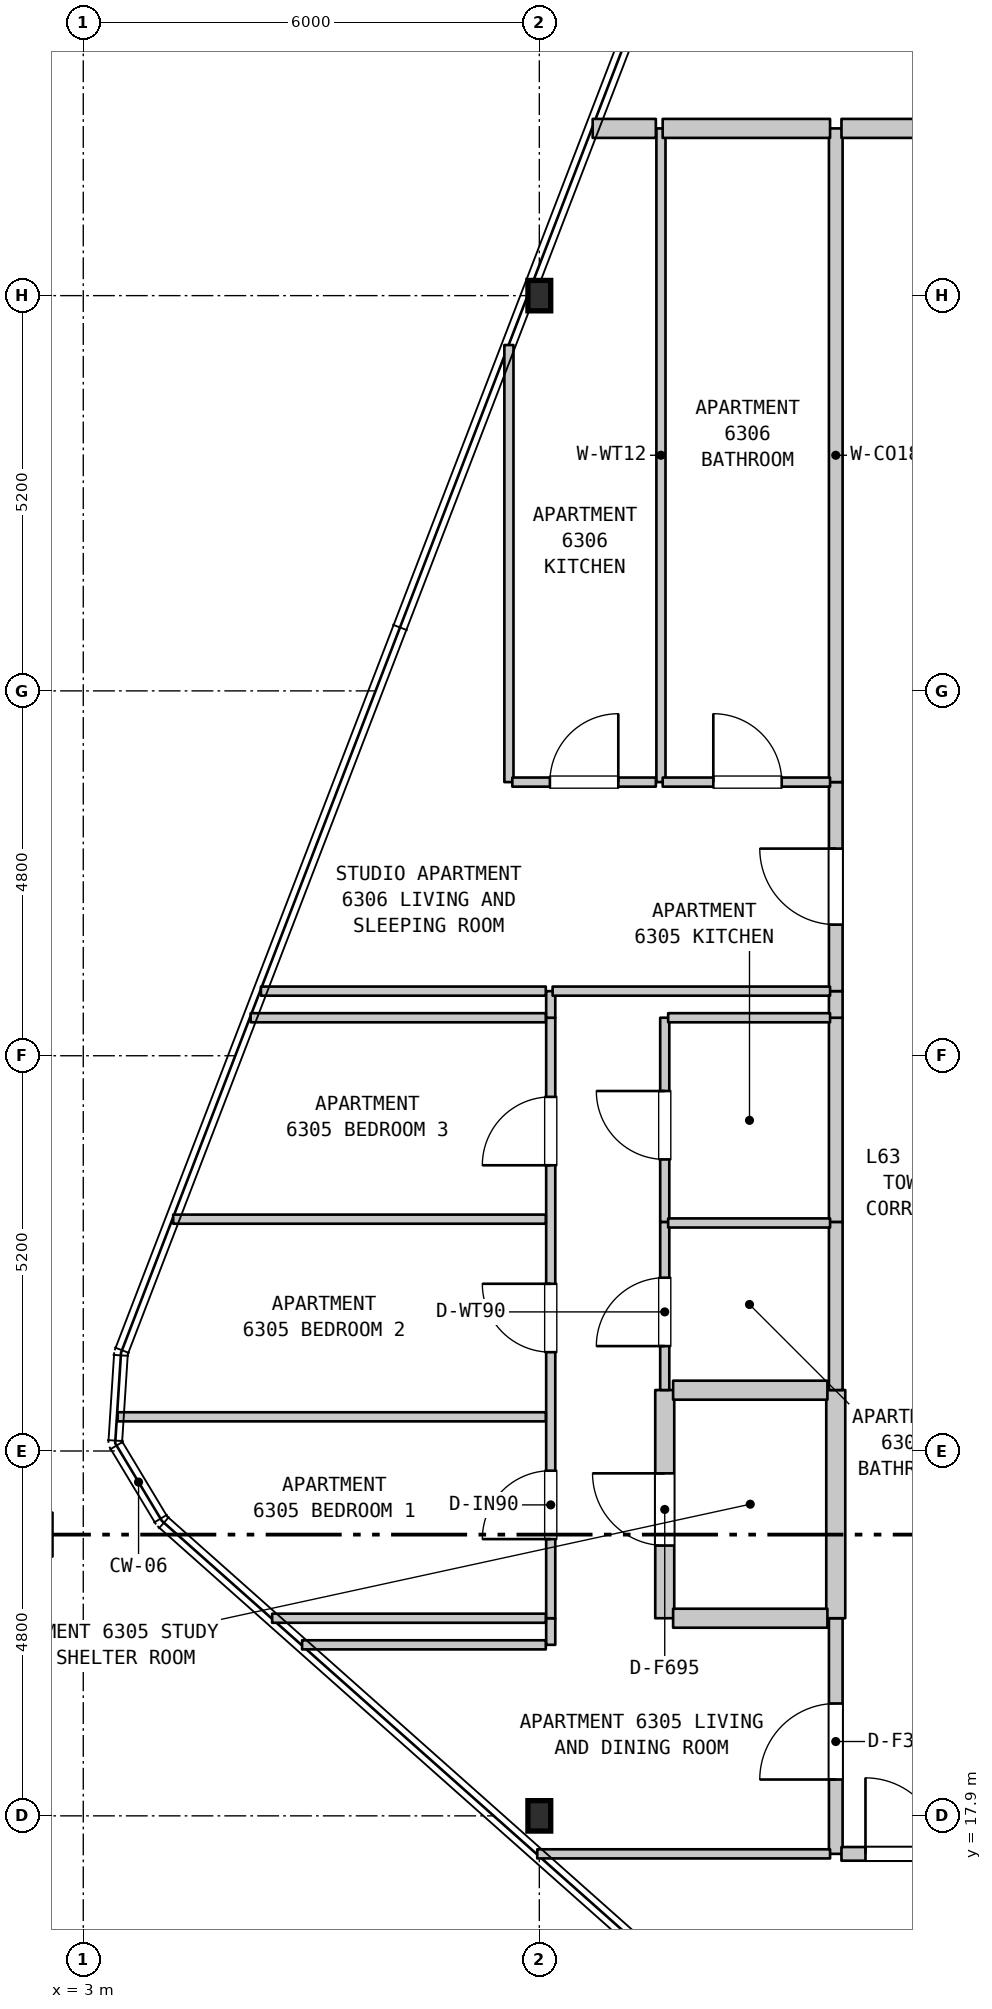
"""IFC4 building model, lengths in metres.
Left out: names, types, materials, properties, quantities, classifications, styles, units other than length and angle.
Written with IfcOpenShell. Run it as: python <this file> out.ifc"""

import sys

from ifc_helpers import new_model, si_unit, direction, frame, frame_2d, origin, origin_2d, place, context, subcontext, project, spatial, rectangle, i_section, extrude, element, fill, save


model = new_model("IFC4")
c1 = context("Model", 3, precision=1e-05, world=origin(), true_north=direction((0.0, 1.0)))
c2 = subcontext(c1, "Body", "Model", "MODEL_VIEW")
j1 = project(units=[si_unit("LENGTHUNIT", "METRE"), si_unit("PLANEANGLEUNIT", "RADIAN")], contexts=[c1])
p1 = place(None, origin())
s1 = spatial("IfcSite", under=j1, at=p1, CompositionType="ELEMENT")
p2 = place(p1, origin())
s2 = spatial("IfcBuilding", under=s1, at=p2, CompositionType="ELEMENT")
p3 = place(p2, frame((0.0, 0.0, 254.7)))
s3 = spatial("IfcBuildingStorey", under=s2, at=p3, CompositionType="ELEMENT", Elevation=254.7)
for number, where, z_axis, x_axis in (
    (1, (9.0, 17.9, 0.0), (0.0, 0.0, 1.0), (1.0, 0.0, 0.0)),
    (2, (9.0, 37.9, 0.0), (0.0, 0.0, 1.0), (1.0, 0.0, 0.0)),
):
    element("IfcColumn", number, at=place(p3, frame(where, z_axis=z_axis, x_axis=x_axis)), inside=s3, PredefinedType="COLUMN", context=c2, shape_type="SweptSolid", body=[
        extrude(i_section(OverallWidth=0.3, OverallDepth=0.4, WebThickness=0.013, FlangeThickness=0.024, FilletRadius=0.027, at=origin_2d()), origin(), (0.0, 0.0, 1.0), 3.7),
    ])
p4 = place(p3, frame((8.6, 31.5, 0.0), z_axis=(0.0, 0.0, 1.0), x_axis=(0.0, 1.0, 0.0)))
e3 = element("IfcWall", 3, at=p4, inside=s3, PredefinedType="PARTITIONING", context=c2, shape_type="SweptSolid", body=[
    extrude(rectangle(XDim=5.75, YDim=0.12, at=frame_2d((2.875, 0.0))), origin(), (0.0, 0.0, 1.0), 3.39),
])
p5 = place(p3, frame((9.15, 20.15, 0.0), z_axis=(0.0, 0.0, 1.0), x_axis=(0.0, 1.0, 0.0)))
e4 = element("IfcWall", 4, at=p5, inside=s3, PredefinedType="PARTITIONING", context=c2, shape_type="SweptSolid", body=[
    extrude(rectangle(XDim=0.35, YDim=0.12, at=frame_2d((0.175, 0.0))), origin(), (0.0, 0.0, 1.0), 3.39),
])
p6 = place(p3, frame((9.15, 20.5, 0.0), z_axis=(0.0, 0.0, 1.0), x_axis=(0.0, 1.0, 0.0)))
e5 = element("IfcWall", 5, at=p6, inside=s3, PredefinedType="PARTITIONING", context=c2, shape_type="SweptSolid", body=[
    extrude(rectangle(XDim=7.9, YDim=0.12, at=frame_2d((3.95, 0.0))), origin(), (0.0, 0.0, 1.0), 2.79),
])
p7 = place(p6, frame((1.041, 0.0, 0.0)))
e6 = element("IfcOpeningElement", 6, at=p7, cuts=e5, PredefinedType="OPENING", context=c2, shape_type="SweptSolid", body=[
    extrude(rectangle(XDim=0.9, YDim=2.15, at=frame_2d((0.45, 1.075))), frame((0.0, 0.07, 0.0), z_axis=(0.0, -1.0, 0.0), x_axis=(1.0, 0.0, 0.0)), (0.0, 0.0, 1.0), 0.14),
])
p8 = place(p6, frame((3.5, 0.0, 0.0)))
e7 = element("IfcOpeningElement", 7, at=p8, cuts=e5, PredefinedType="OPENING", context=c2, shape_type="SweptSolid", body=[
    extrude(rectangle(XDim=0.9, YDim=2.15, at=frame_2d((0.45, 1.075))), frame((0.0, 0.07, 0.0), z_axis=(0.0, -1.0, 0.0), x_axis=(1.0, 0.0, 0.0)), (0.0, 0.0, 1.0), 0.14),
])
p9 = place(p6, frame((5.959, 0.0, 0.0)))
e8 = element("IfcOpeningElement", 8, at=p9, cuts=e5, PredefinedType="OPENING", context=c2, shape_type="SweptSolid", body=[
    extrude(rectangle(XDim=0.9, YDim=2.15, at=frame_2d((0.45, 1.075))), frame((0.0, 0.07, 0.0), z_axis=(0.0, -1.0, 0.0), x_axis=(1.0, 0.0, 0.0)), (0.0, 0.0, 1.0), 0.14),
])
p10 = place(p3, frame((9.15, 28.4, 0.0), z_axis=(0.0, 0.0, 1.0), x_axis=(0.0, 1.0, 0.0)))
e9 = element("IfcWall", 9, at=p10, inside=s3, PredefinedType="PARTITIONING", context=c2, shape_type="SweptSolid", body=[
    extrude(rectangle(XDim=0.35, YDim=0.12, at=frame_2d((0.175, 0.0))), origin(), (0.0, 0.0, 1.0), 3.39),
])
p11 = place(p3, frame((10.6, 31.5, 0.0), z_axis=(0.0, 0.0, 1.0), x_axis=(0.0, 1.0, 0.0)))
e10 = element("IfcWall", 10, at=p11, inside=s3, PredefinedType="PARTITIONING", context=c2, shape_type="SweptSolid", body=[
    extrude(rectangle(XDim=8.6, YDim=0.12, at=frame_2d((4.3, 0.0))), origin(), (0.0, 0.0, 1.0), 3.39),
])
p12 = place(p3, frame((10.65, 20.5, 0.0), z_axis=(0.0, 0.0, 1.0), x_axis=(0.0, 1.0, 0.0)))
e11 = element("IfcWall", 11, at=p12, inside=s3, PredefinedType="STANDARD", context=c2, shape_type="SweptSolid", body=[
    extrude(rectangle(XDim=3.002, YDim=0.25, at=frame_2d((1.501, 0.0))), origin(), (0.0, 0.0, 1.0), 3.39),
])
p13 = place(p12, frame((0.956, 0.0, 0.0)))
e12 = element("IfcOpeningElement", 12, at=p13, cuts=e11, PredefinedType="OPENING", context=c2, shape_type="SweptSolid", body=[
    extrude(rectangle(XDim=0.95, YDim=2.15, at=frame_2d((0.475, 1.075))), frame((0.0, 0.135, 0.0), z_axis=(0.0, -1.0, 0.0), x_axis=(1.0, 0.0, 0.0)), (0.0, 0.0, 1.0), 0.27),
])
p14 = place(p3, frame((10.65, 23.502, 0.0), z_axis=(0.0, 0.0, 1.0), x_axis=(0.0, 1.0, 0.0)))
e13 = element("IfcWall", 13, at=p14, inside=s3, PredefinedType="PARTITIONING", context=c2, shape_type="SweptSolid", body=[
    extrude(rectangle(XDim=2.212, YDim=0.12, at=frame_2d((1.106, 0.0))), origin(), (0.0, 0.0, 1.0), 3.39),
])
p15 = place(p14, frame((0.578, 0.0, 0.0)))
e14 = element("IfcOpeningElement", 14, at=p15, cuts=e13, PredefinedType="OPENING", context=c2, shape_type="SweptSolid", body=[
    extrude(rectangle(XDim=0.9, YDim=2.1, at=frame_2d((0.45, 1.05))), frame((0.0, 0.07, 0.0), z_axis=(0.0, -1.0, 0.0), x_axis=(1.0, 0.0, 0.0)), (0.0, 0.0, 1.0), 0.14),
])
p16 = place(p3, frame((10.65, 25.714, 0.0), z_axis=(0.0, 0.0, 1.0), x_axis=(0.0, 1.0, 0.0)))
e15 = element("IfcWall", 15, at=p16, inside=s3, PredefinedType="PARTITIONING", context=c2, shape_type="SweptSolid", body=[
    extrude(rectangle(XDim=2.686, YDim=0.12, at=frame_2d((1.343, 0.0))), origin(), (0.0, 0.0, 1.0), 3.39),
])
p17 = place(p16, frame((0.822, 0.0, 0.0)))
e16 = element("IfcOpeningElement", 16, at=p17, cuts=e15, PredefinedType="OPENING", context=c2, shape_type="SweptSolid", body=[
    extrude(rectangle(XDim=0.9, YDim=2.15, at=frame_2d((0.45, 1.075))), frame((0.0, 0.07, 0.0), z_axis=(0.0, -1.0, 0.0), x_axis=(1.0, 0.0, 0.0)), (0.0, 0.0, 1.0), 0.14),
])
p18 = place(p3, frame((12.9, 17.4, 0.0), z_axis=(0.0, 0.0, 1.0), x_axis=(0.0, 1.0, 0.0)))
e17 = element("IfcWall", 17, at=p18, inside=s3, PredefinedType="STANDARD", context=c2, shape_type="SweptSolid", body=[
    extrude(rectangle(XDim=3.1, YDim=0.18, at=frame_2d((1.55, 0.0))), origin(), (0.0, 0.0, 1.0), 3.39),
])
p19 = place(p18, frame((0.978, 0.0, 0.0)))
e18 = element("IfcOpeningElement", 18, at=p19, cuts=e17, PredefinedType="OPENING", context=c2, shape_type="SweptSolid", body=[
    extrude(rectangle(XDim=1.0, YDim=2.15, at=frame_2d((0.5, 1.075))), frame((0.0, 0.1, 0.0), z_axis=(0.0, -1.0, 0.0), x_axis=(1.0, 0.0, 0.0)), (0.0, 0.0, 1.0), 0.2),
])
p20 = place(p3, frame((12.9, 20.5, 0.0), z_axis=(0.0, 0.0, 1.0), x_axis=(0.0, 1.0, 0.0)))
e19 = element("IfcWall", 19, at=p20, inside=s3, PredefinedType="STANDARD", context=c2, shape_type="SweptSolid", body=[
    extrude(rectangle(XDim=3.002, YDim=0.25, at=frame_2d((1.501, 0.0))), origin(), (0.0, 0.0, 1.0), 3.39),
])
p21 = place(p3, frame((12.9, 23.502, 0.0), z_axis=(0.0, 0.0, 1.0), x_axis=(0.0, 1.0, 0.0)))
e20 = element("IfcWall", 20, at=p21, inside=s3, PredefinedType="STANDARD", context=c2, shape_type="SweptSolid", body=[
    extrude(rectangle(XDim=2.212, YDim=0.18, at=frame_2d((1.106, 0.0))), origin(), (0.0, 0.0, 1.0), 3.39),
])
p22 = place(p3, frame((12.9, 25.714, 0.0), z_axis=(0.0, 0.0, 1.0), x_axis=(0.0, 1.0, 0.0)))
e21 = element("IfcWall", 21, at=p22, inside=s3, PredefinedType="STANDARD", context=c2, shape_type="SweptSolid", body=[
    extrude(rectangle(XDim=2.686, YDim=0.18, at=frame_2d((1.343, 0.0))), origin(), (0.0, 0.0, 1.0), 3.39),
])
p23 = place(p3, frame((12.9, 28.4, 0.0), z_axis=(0.0, 0.0, 1.0), x_axis=(0.0, 1.0, 0.0)))
e22 = element("IfcWall", 22, at=p23, inside=s3, PredefinedType="STANDARD", context=c2, shape_type="SweptSolid", body=[
    extrude(rectangle(XDim=0.35, YDim=0.18, at=frame_2d((0.175, 0.0))), origin(), (0.0, 0.0, 1.0), 3.39),
])
p24 = place(p3, frame((12.9, 28.75, 0.0), z_axis=(0.0, 0.0, 1.0), x_axis=(0.0, 1.0, 0.0)))
e23 = element("IfcWall", 23, at=p24, inside=s3, PredefinedType="STANDARD", context=c2, shape_type="SweptSolid", body=[
    extrude(rectangle(XDim=2.75, YDim=0.18, at=frame_2d((1.375, 0.0))), origin(), (0.0, 0.0, 1.0), 3.39),
])
p25 = place(p24, frame((0.875, 0.0, 0.0)))
e24 = element("IfcOpeningElement", 24, at=p25, cuts=e23, PredefinedType="OPENING", context=c2, shape_type="SweptSolid", body=[
    extrude(rectangle(XDim=1.0, YDim=2.15, at=frame_2d((0.5, 1.075))), frame((0.0, 0.1, 0.0), z_axis=(0.0, -1.0, 0.0), x_axis=(1.0, 0.0, 0.0)), (0.0, 0.0, 1.0), 0.2),
])
p26 = place(p3, frame((12.9, 31.5, 0.0), z_axis=(0.0, 0.0, 1.0), x_axis=(0.0, 1.0, 0.0)))
e25 = element("IfcWall", 25, at=p26, inside=s3, PredefinedType="STANDARD", context=c2, shape_type="SweptSolid", body=[
    extrude(rectangle(XDim=8.6, YDim=0.18, at=frame_2d((4.3, 0.0))), origin(), (0.0, 0.0, 1.0), 3.39),
])
p27 = place(p3, frame((8.973, 17.4, 0.0), z_axis=(0.0, 0.0, 1.0), x_axis=(1.0, 0.0, 0.0)))
e26 = element("IfcWall", 26, at=p27, inside=s3, PredefinedType="PARTITIONING", context=c2, shape_type="SweptSolid", body=[
    extrude(rectangle(XDim=3.852, YDim=0.12, at=frame_2d((1.926, 0.0))), origin(), (0.0, 0.0, 1.0), 3.39),
])
p28 = place(p3, frame((12.975, 17.4, 0.0), z_axis=(0.0, 0.0, 1.0), x_axis=(1.0, 0.0, 0.0)))
e27 = element("IfcWall", 27, at=p28, inside=s3, PredefinedType="STANDARD", context=c2, shape_type="SweptSolid", body=[
    extrude(rectangle(XDim=3.49, YDim=0.18, at=frame_2d((1.745, 0.0))), origin(), (0.0, 0.0, 1.0), 3.39),
])
p29 = place(p28, frame((0.316, 0.0, 0.0)))
e28 = element("IfcOpeningElement", 28, at=p29, cuts=e27, PredefinedType="OPENING", context=c2, shape_type="SweptSolid", body=[
    extrude(rectangle(XDim=1.0, YDim=2.15, at=frame_2d((0.5, 1.075))), frame((0.0, 0.1, 0.0), z_axis=(0.0, -1.0, 0.0), x_axis=(1.0, 0.0, 0.0)), (0.0, 0.0, 1.0), 0.2),
])
p30 = place(p3, frame((5.879, 20.15, 0.0), z_axis=(0.0, 0.0, 1.0), x_axis=(1.0, 0.0, 0.0)))
e29 = element("IfcWall", 29, at=p30, inside=s3, PredefinedType="PARTITIONING", context=c2, shape_type="SweptSolid", body=[
    extrude(rectangle(XDim=3.206, YDim=0.12, at=frame_2d((1.603, 0.0))), origin(), (0.0, 0.0, 1.0), 3.39),
])
p31 = place(p3, frame((5.485, 20.5, 0.0), z_axis=(0.0, 0.0, 1.0), x_axis=(1.0, 0.0, 0.0)))
e30 = element("IfcWall", 30, at=p31, inside=s3, PredefinedType="PARTITIONING", context=c2, shape_type="SweptSolid", body=[
    extrude(rectangle(XDim=3.6, YDim=0.12, at=frame_2d((1.8, 0.0))), origin(), (0.0, 0.0, 1.0), 3.39),
])
p32 = place(p3, frame((10.76, 20.5, 0.0), z_axis=(0.0, 0.0, 1.0), x_axis=(1.0, 0.0, 0.0)))
e31 = element("IfcWall", 31, at=p32, inside=s3, PredefinedType="STANDARD", context=c2, shape_type="SweptSolid", body=[
    extrude(rectangle(XDim=2.03, YDim=0.25, at=frame_2d((1.015, 0.0))), origin(), (0.0, 0.0, 1.0), 3.39),
])
p33 = place(p3, frame((3.452, 23.15, 0.0), z_axis=(0.0, 0.0, 1.0), x_axis=(1.0, 0.0, 0.0)))
e32 = element("IfcWall", 32, at=p33, inside=s3, PredefinedType="PARTITIONING", context=c2, shape_type="SweptSolid", body=[
    extrude(rectangle(XDim=5.633, YDim=0.12, at=frame_2d((2.816, 0.0))), origin(), (0.0, 0.0, 1.0), 3.39),
])
p34 = place(p3, frame((10.76, 23.5, 0.0), z_axis=(0.0, 0.0, 1.0), x_axis=(1.0, 0.0, 0.0)))
e33 = element("IfcWall", 33, at=p34, inside=s3, PredefinedType="STANDARD", context=c2, shape_type="SweptSolid", body=[
    extrude(rectangle(XDim=2.03, YDim=0.25, at=frame_2d((1.015, 0.0))), origin(), (0.0, 0.0, 1.0), 3.39),
])
p35 = place(p3, frame((10.695, 25.7, 0.0), z_axis=(0.0, 0.0, 1.0), x_axis=(1.0, 0.0, 0.0)))
e34 = element("IfcWall", 34, at=p35, inside=s3, PredefinedType="PARTITIONING", context=c2, shape_type="SweptSolid", body=[
    extrude(rectangle(XDim=2.13, YDim=0.12, at=frame_2d((1.065, 0.0))), origin(), (0.0, 0.0, 1.0), 3.39),
])
p36 = place(p3, frame((4.183, 25.75, 0.0), z_axis=(0.0, 0.0, 1.0), x_axis=(1.0, 0.0, 0.0)))
e35 = element("IfcWall", 35, at=p36, inside=s3, PredefinedType="PARTITIONING", context=c2, shape_type="SweptSolid", body=[
    extrude(rectangle(XDim=4.902, YDim=0.12, at=frame_2d((2.451, 0.0))), origin(), (0.0, 0.0, 1.0), 3.39),
])
p37 = place(p3, frame((5.202, 28.4, 0.0), z_axis=(0.0, 0.0, 1.0), x_axis=(1.0, 0.0, 0.0)))
e36 = element("IfcWall", 36, at=p37, inside=s3, PredefinedType="PARTITIONING", context=c2, shape_type="SweptSolid", body=[
    extrude(rectangle(XDim=3.883, YDim=0.12, at=frame_2d((1.941, 0.0))), origin(), (0.0, 0.0, 1.0), 3.39),
])
p38 = place(p3, frame((10.695, 28.4, 0.0), z_axis=(0.0, 0.0, 1.0), x_axis=(1.0, 0.0, 0.0)))
e37 = element("IfcWall", 37, at=p38, inside=s3, PredefinedType="PARTITIONING", context=c2, shape_type="SweptSolid", body=[
    extrude(rectangle(XDim=2.13, YDim=0.12, at=frame_2d((1.065, 0.0))), origin(), (0.0, 0.0, 1.0), 3.39),
])
p39 = place(p3, frame((5.337, 28.75, 0.0), z_axis=(0.0, 0.0, 1.0), x_axis=(1.0, 0.0, 0.0)))
e38 = element("IfcWall", 38, at=p39, inside=s3, PredefinedType="PARTITIONING", context=c2, shape_type="SweptSolid", body=[
    extrude(rectangle(XDim=3.748, YDim=0.12, at=frame_2d((1.874, 0.0))), origin(), (0.0, 0.0, 1.0), 3.39),
])
p40 = place(p3, frame((9.175, 28.75, 0.0), z_axis=(0.0, 0.0, 1.0), x_axis=(1.0, 0.0, 0.0)))
e39 = element("IfcWall", 39, at=p40, inside=s3, PredefinedType="PARTITIONING", context=c2, shape_type="SweptSolid", body=[
    extrude(rectangle(XDim=3.65, YDim=0.12, at=frame_2d((1.825, 0.0))), origin(), (0.0, 0.0, 1.0), 3.39),
])
p41 = place(p3, frame((8.645, 31.5, 0.0), z_axis=(0.0, 0.0, 1.0), x_axis=(1.0, 0.0, 0.0)))
e40 = element("IfcWall", 40, at=p41, inside=s3, PredefinedType="PARTITIONING", context=c2, shape_type="SweptSolid", body=[
    extrude(rectangle(XDim=1.888, YDim=0.12, at=frame_2d((0.944, 0.0))), origin(), (0.0, 0.0, 1.0), 3.39),
])
p42 = place(p41, frame((0.494, 0.0, 0.0)))
e41 = element("IfcOpeningElement", 41, at=p42, cuts=e40, PredefinedType="OPENING", context=c2, shape_type="SweptSolid", body=[
    extrude(rectangle(XDim=0.9, YDim=2.15, at=frame_2d((0.45, 1.075))), frame((0.0, 0.07, 0.0), z_axis=(0.0, -1.0, 0.0), x_axis=(1.0, 0.0, 0.0)), (0.0, 0.0, 1.0), 0.14),
])
p43 = place(p3, frame((10.623, 31.5, 0.0), z_axis=(0.0, 0.0, 1.0), x_axis=(1.0, 0.0, 0.0)))
e42 = element("IfcWall", 42, at=p43, inside=s3, PredefinedType="PARTITIONING", context=c2, shape_type="SweptSolid", body=[
    extrude(rectangle(XDim=2.202, YDim=0.12, at=frame_2d((1.101, 0.0))), origin(), (0.0, 0.0, 1.0), 3.39),
])
p44 = place(p43, frame((0.666, 0.0, 0.0)))
e43 = element("IfcOpeningElement", 43, at=p44, cuts=e42, PredefinedType="OPENING", context=c2, shape_type="SweptSolid", body=[
    extrude(rectangle(XDim=0.9, YDim=2.1, at=frame_2d((0.45, 1.05))), frame((0.0, 0.07, 0.0), z_axis=(0.0, -1.0, 0.0), x_axis=(1.0, 0.0, 0.0)), (0.0, 0.0, 1.0), 0.14),
])
p45 = place(p3, frame((9.702, 40.1, 0.0), z_axis=(0.0, 0.0, 1.0), x_axis=(1.0, 0.0, 0.0)))
e44 = element("IfcWall", 44, at=p45, inside=s3, PredefinedType="STANDARD", context=c2, shape_type="SweptSolid", body=[
    extrude(rectangle(XDim=0.831, YDim=0.25, at=frame_2d((0.416, 0.0))), origin(), (0.0, 0.0, 1.0), 3.39),
])
p46 = place(p3, frame((10.623, 40.1, 0.0), z_axis=(0.0, 0.0, 1.0), x_axis=(1.0, 0.0, 0.0)))
e45 = element("IfcWall", 45, at=p46, inside=s3, PredefinedType="STANDARD", context=c2, shape_type="SweptSolid", body=[
    extrude(rectangle(XDim=2.202, YDim=0.25, at=frame_2d((1.101, 0.0))), origin(), (0.0, 0.0, 1.0), 3.39),
])
p47 = place(p3, frame((12.975, 40.1, 0.0), z_axis=(0.0, 0.0, 1.0), x_axis=(1.0, 0.0, 0.0)))
e46 = element("IfcWall", 46, at=p47, inside=s3, PredefinedType="STANDARD", context=c2, shape_type="SweptSolid", body=[
    extrude(rectangle(XDim=1.48, YDim=0.25, at=frame_2d((0.74, 0.0))), origin(), (0.0, 0.0, 1.0), 3.39),
])
p48 = place(p7, origin())
e47 = element("IfcDoor", 47, at=p48, inside=s3, OperationType="SINGLE_SWING_LEFT", PredefinedType="DOOR", context=c2, shape_type="SweptSolid", body=[
    extrude(rectangle(XDim=0.9, YDim=2.15, at=frame_2d((0.45, 1.075))), frame((0.0, 0.025, 0.0), z_axis=(0.0, -1.0, 0.0), x_axis=(1.0, 0.0, 0.0)), (0.0, 0.0, 1.0), 0.05),
])
fill(e6, e47)
p49 = place(p8, origin())
e48 = element("IfcDoor", 48, at=p49, inside=s3, OperationType="SINGLE_SWING_RIGHT", PredefinedType="DOOR", context=c2, shape_type="SweptSolid", body=[
    extrude(rectangle(XDim=0.9, YDim=2.15, at=frame_2d((0.45, 1.075))), frame((0.0, 0.025, 0.0), z_axis=(0.0, -1.0, 0.0), x_axis=(1.0, 0.0, 0.0)), (0.0, 0.0, 1.0), 0.05),
])
fill(e7, e48)
p50 = place(p9, origin())
e49 = element("IfcDoor", 49, at=p50, inside=s3, OperationType="SINGLE_SWING_LEFT", PredefinedType="DOOR", context=c2, shape_type="SweptSolid", body=[
    extrude(rectangle(XDim=0.9, YDim=2.15, at=frame_2d((0.45, 1.075))), frame((0.0, 0.025, 0.0), z_axis=(0.0, -1.0, 0.0), x_axis=(1.0, 0.0, 0.0)), (0.0, 0.0, 1.0), 0.05),
])
fill(e8, e49)
p51 = place(p13, origin())
e50 = element("IfcDoor", 50, at=p51, inside=s3, OperationType="SINGLE_SWING_RIGHT", PredefinedType="DOOR", context=c2, shape_type="SweptSolid", body=[
    extrude(rectangle(XDim=0.95, YDim=2.15, at=frame_2d((0.475, 1.075))), frame((0.0, 0.025, 0.0), z_axis=(0.0, -1.0, 0.0), x_axis=(1.0, 0.0, 0.0)), (0.0, 0.0, 1.0), 0.05),
])
fill(e12, e50)
p52 = place(p15, origin())
e51 = element("IfcDoor", 51, at=p52, inside=s3, OperationType="SINGLE_SWING_LEFT", PredefinedType="DOOR", context=c2, shape_type="SweptSolid", body=[
    extrude(rectangle(XDim=0.9, YDim=2.1, at=frame_2d((0.45, 1.05))), frame((0.0, 0.025, 0.0), z_axis=(0.0, -1.0, 0.0), x_axis=(1.0, 0.0, 0.0)), (0.0, 0.0, 1.0), 0.05),
])
fill(e14, e51)
p53 = place(p17, origin())
e52 = element("IfcDoor", 52, at=p53, inside=s3, OperationType="SINGLE_SWING_RIGHT", PredefinedType="DOOR", context=c2, shape_type="SweptSolid", body=[
    extrude(rectangle(XDim=0.9, YDim=2.15, at=frame_2d((0.45, 1.075))), frame((0.0, 0.025, 0.0), z_axis=(0.0, -1.0, 0.0), x_axis=(1.0, 0.0, 0.0)), (0.0, 0.0, 1.0), 0.05),
])
fill(e16, e52)
p54 = place(p19, origin())
e53 = element("IfcDoor", 53, at=p54, inside=s3, OperationType="SINGLE_SWING_LEFT", PredefinedType="DOOR", context=c2, shape_type="SweptSolid", body=[
    extrude(rectangle(XDim=1.0, YDim=2.15, at=frame_2d((0.5, 1.075))), frame((0.0, 0.025, 0.0), z_axis=(0.0, -1.0, 0.0), x_axis=(1.0, 0.0, 0.0)), (0.0, 0.0, 1.0), 0.05),
])
fill(e18, e53)
p55 = place(p25, origin())
e54 = element("IfcDoor", 54, at=p55, inside=s3, OperationType="SINGLE_SWING_RIGHT", PredefinedType="DOOR", context=c2, shape_type="SweptSolid", body=[
    extrude(rectangle(XDim=1.0, YDim=2.15, at=frame_2d((0.5, 1.075))), frame((0.0, 0.025, 0.0), z_axis=(0.0, -1.0, 0.0), x_axis=(1.0, 0.0, 0.0)), (0.0, 0.0, 1.0), 0.05),
])
fill(e24, e54)
p56 = place(p29, origin())
e55 = element("IfcDoor", 55, at=p56, inside=s3, OperationType="SINGLE_SWING_LEFT", PredefinedType="DOOR", context=c2, shape_type="SweptSolid", body=[
    extrude(rectangle(XDim=1.0, YDim=2.15, at=frame_2d((0.5, 1.075))), frame((0.0, 0.025, 0.0), z_axis=(0.0, -1.0, 0.0), x_axis=(1.0, 0.0, 0.0)), (0.0, 0.0, 1.0), 0.05),
])
fill(e28, e55)
p57 = place(p42, origin())
e56 = element("IfcDoor", 56, at=p57, inside=s3, OperationType="SINGLE_SWING_RIGHT", PredefinedType="DOOR", context=c2, shape_type="SweptSolid", body=[
    extrude(rectangle(XDim=0.9, YDim=2.15, at=frame_2d((0.45, 1.075))), frame((0.0, 0.025, 0.0), z_axis=(0.0, -1.0, 0.0), x_axis=(1.0, 0.0, 0.0)), (0.0, 0.0, 1.0), 0.05),
])
fill(e41, e56)
p58 = place(p44, origin())
e57 = element("IfcDoor", 57, at=p58, inside=s3, OperationType="SINGLE_SWING_LEFT", PredefinedType="DOOR", context=c2, shape_type="SweptSolid", body=[
    extrude(rectangle(XDim=0.9, YDim=2.1, at=frame_2d((0.45, 1.05))), frame((0.0, 0.025, 0.0), z_axis=(0.0, -1.0, 0.0), x_axis=(1.0, 0.0, 0.0)), (0.0, 0.0, 1.0), 0.05),
])
fill(e43, e57)
save(model, sys.argv[1])
